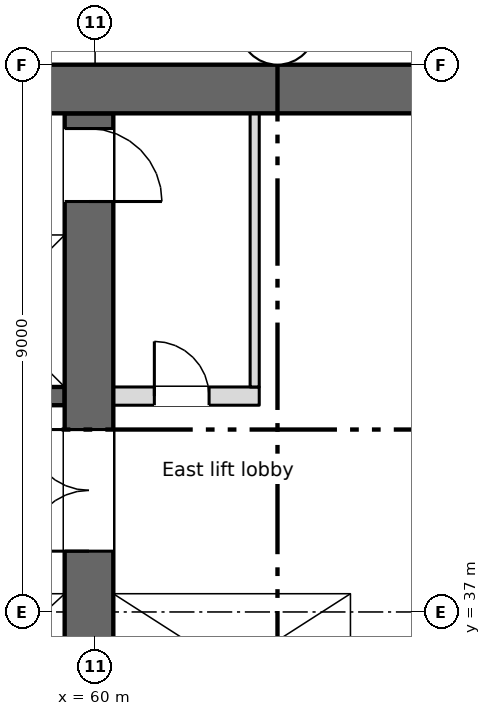
"""IFC4 building model, lengths in metres.
Left out: names, types, materials, properties, quantities, classifications, styles, units other than length and angle.
Written with IfcOpenShell. Run it as: python <this file> out.ifc"""

import sys

from ifc_helpers import new_model, si_unit, direction, frame, frame_2d, origin, place, context, subcontext, project, spatial, rectangle, extrude, element, fill, save


model = new_model("IFC4")
c1 = context("Model", 3, precision=1e-05, world=origin(), true_north=direction((0.0, 1.0)))
c2 = subcontext(c1, "Body", "Model", "MODEL_VIEW")
j1 = project(units=[si_unit("LENGTHUNIT", "METRE"), si_unit("PLANEANGLEUNIT", "RADIAN")], contexts=[c1])
p1 = place(None, origin())
s1 = spatial("IfcSite", under=j1, at=p1, CompositionType="ELEMENT")
p2 = place(p1, origin())
s2 = spatial("IfcBuilding", under=s1, at=p2, CompositionType="ELEMENT")
p3 = place(p2, frame((0.0, 0.0, 102.5)))
s3 = spatial("IfcBuildingStorey", under=s2, at=p3, CompositionType="ELEMENT", Elevation=102.5)
p4 = place(p3, frame((5.55, 45.6, 0.0), z_axis=(0.0, 0.0, 1.0), x_axis=(1.0, 0.0, 0.0)))
e1 = element("IfcWall", 1, at=p4, inside=s3, PredefinedType="SHEAR", context=c2, shape_type="SweptSolid", body=[
    extrude(rectangle(XDim=60.9, YDim=0.8, at=frame_2d((30.45, 0.0))), origin(), (0.0, 0.0, 1.0), 3.35),
])
p5 = place(p4, frame((1.2, 0.0, 0.6)))
e2 = element("IfcOpeningElement", 2, at=p5, cuts=e1, PredefinedType="OPENING", context=c2, shape_type="SweptSolid", body=[
    extrude(rectangle(XDim=0.6, YDim=2.4, at=frame_2d((0.3, 1.2))), frame((0.0, 0.41, 0.0), z_axis=(0.0, -1.0, 0.0), x_axis=(1.0, 0.0, 0.0)), (0.0, 0.0, 1.0), 0.82),
])
p6 = place(p4, frame((7.2, 0.0, 0.6)))
e3 = element("IfcOpeningElement", 3, at=p6, cuts=e1, PredefinedType="OPENING", context=c2, shape_type="SweptSolid", body=[
    extrude(rectangle(XDim=0.6, YDim=2.4, at=frame_2d((0.3, 1.2))), frame((0.0, 0.41, 0.0), z_axis=(0.0, -1.0, 0.0), x_axis=(1.0, 0.0, 0.0)), (0.0, 0.0, 1.0), 0.82),
])
p7 = place(p3, frame((64.35, 34.8, 0.0), z_axis=(0.0, 0.0, 1.0), x_axis=(0.0, 1.0, 0.0)))
e4 = element("IfcWall", 4, at=p7, inside=s3, PredefinedType="SHEAR", context=c2, shape_type="SweptSolid", body=[
    extrude(rectangle(XDim=10.4, YDim=0.3, at=frame_2d((5.2, 0.0))), origin(), (0.0, 0.0, 1.0), 3.35),
])
p8 = place(p3, frame((59.9, 28.4, 0.0), z_axis=(0.0, 0.0, 1.0), x_axis=(0.0, 1.0, 0.0)))
e5 = element("IfcWall", 5, at=p8, inside=s3, PredefinedType="SHEAR", context=c2, shape_type="SweptSolid", body=[
    extrude(rectangle(XDim=16.8, YDim=0.8, at=frame_2d((8.4, 0.0))), origin(), (0.0, 0.0, 1.0), 3.35),
])
p9 = place(p8, frame((9.6, 0.0, 0.0)))
e6 = element("IfcOpeningElement", 6, at=p9, cuts=e5, PredefinedType="OPENING", context=c2, shape_type="SweptSolid", body=[
    extrude(rectangle(XDim=2.0, YDim=2.1, at=frame_2d((1.0, 1.05))), frame((0.0, 0.41, 0.0), z_axis=(0.0, -1.0, 0.0), x_axis=(1.0, 0.0, 0.0)), (0.0, 0.0, 1.0), 0.82),
])
p10 = place(p8, frame((15.35, 0.0, 0.0)))
e7 = element("IfcOpeningElement", 7, at=p10, cuts=e5, PredefinedType="OPENING", context=c2, shape_type="SweptSolid", body=[
    extrude(rectangle(XDim=1.2, YDim=2.1, at=frame_2d((0.6, 1.05))), frame((0.0, 0.41, 0.0), z_axis=(0.0, -1.0, 0.0), x_axis=(1.0, 0.0, 0.0)), (0.0, 0.0, 1.0), 0.82),
])
p11 = place(p3, frame((47.3, 37.45, 0.0), z_axis=(0.0, 0.0, 1.0), x_axis=(1.0, 0.0, 0.0)))
e8 = element("IfcWall", 8, at=p11, inside=s3, PredefinedType="SHEAR", context=c2, shape_type="SweptSolid", body=[
    extrude(rectangle(XDim=12.2, YDim=0.3, at=frame_2d((6.1, 0.0))), origin(), (0.0, 0.0, 1.0), 3.35),
])
p12 = place(p11, frame((4.3, 0.0, 0.0)))
e9 = element("IfcOpeningElement", 9, at=p12, cuts=e8, PredefinedType="OPENING", context=c2, shape_type="SweptSolid", body=[
    extrude(rectangle(XDim=1.1, YDim=2.1, at=frame_2d((0.55, 1.05))), frame((0.0, 0.16, 0.0), z_axis=(0.0, -1.0, 0.0), x_axis=(1.0, 0.0, 0.0)), (0.0, 0.0, 1.0), 0.32),
])
p13 = place(p11, frame((7.3, 0.0, 0.0)))
e10 = element("IfcOpeningElement", 10, at=p13, cuts=e8, PredefinedType="OPENING", context=c2, shape_type="SweptSolid", body=[
    extrude(rectangle(XDim=1.1, YDim=2.1, at=frame_2d((0.55, 1.05))), frame((0.0, 0.16, 0.0), z_axis=(0.0, -1.0, 0.0), x_axis=(1.0, 0.0, 0.0)), (0.0, 0.0, 1.0), 0.32),
])
p14 = place(p11, frame((10.3, 0.0, 0.0)))
e11 = element("IfcOpeningElement", 11, at=p14, cuts=e8, PredefinedType="OPENING", context=c2, shape_type="SweptSolid", body=[
    extrude(rectangle(XDim=1.1, YDim=2.1, at=frame_2d((0.55, 1.05))), frame((0.0, 0.16, 0.0), z_axis=(0.0, -1.0, 0.0), x_axis=(1.0, 0.0, 0.0)), (0.0, 0.0, 1.0), 0.32),
])
p15 = place(p3, frame((60.3, 37.45, 0.0), z_axis=(0.0, 0.0, 1.0), x_axis=(1.0, 0.0, 0.0)))
e12 = element("IfcWall", 12, at=p15, inside=s3, PredefinedType="SHEAR", context=c2, shape_type="SweptSolid", body=[
    extrude(rectangle(XDim=3.9, YDim=0.3, at=frame_2d((1.95, 0.0))), origin(), (0.0, 0.0, 1.0), 3.35),
])
p16 = place(p15, frame((1.4, 0.0, 0.0)))
e13 = element("IfcOpeningElement", 13, at=p16, cuts=e12, PredefinedType="OPENING", context=c2, shape_type="SweptSolid", body=[
    extrude(rectangle(XDim=1.1, YDim=2.1, at=frame_2d((0.55, 1.05))), frame((0.0, 0.16, 0.0), z_axis=(0.0, -1.0, 0.0), x_axis=(1.0, 0.0, 0.0)), (0.0, 0.0, 1.0), 0.32),
])
p17 = place(p3, frame((18.5, 40.55, 0.0), z_axis=(0.0, 0.0, 1.0), x_axis=(1.0, 0.0, 0.0)))
e14 = element("IfcWall", 14, at=p17, inside=s3, PredefinedType="SHEAR", context=c2, shape_type="SweptSolid", body=[
    extrude(rectangle(XDim=41.0, YDim=0.3, at=frame_2d((20.5, 0.0))), origin(), (0.0, 0.0, 1.0), 3.35),
])
p18 = place(p17, frame((18.65, 0.0, 0.0)))
e15 = element("IfcOpeningElement", 15, at=p18, cuts=e14, PredefinedType="OPENING", context=c2, shape_type="SweptSolid", body=[
    extrude(rectangle(XDim=0.9, YDim=2.1, at=frame_2d((0.45, 1.05))), frame((0.0, 0.16, 0.0), z_axis=(0.0, -1.0, 0.0), x_axis=(1.0, 0.0, 0.0)), (0.0, 0.0, 1.0), 0.32),
])
p19 = place(p17, frame((6.175, 0.0, 0.0)))
e16 = element("IfcOpeningElement", 16, at=p19, cuts=e14, PredefinedType="OPENING", context=c2, shape_type="SweptSolid", body=[
    extrude(rectangle(XDim=1.1, YDim=2.1, at=frame_2d((0.55, 1.05))), frame((0.0, 0.16, 0.0), z_axis=(0.0, -1.0, 0.0), x_axis=(1.0, 0.0, 0.0)), (0.0, 0.0, 1.0), 0.32),
])
p20 = place(p17, frame((8.925, 0.0, 0.0)))
e17 = element("IfcOpeningElement", 17, at=p20, cuts=e14, PredefinedType="OPENING", context=c2, shape_type="SweptSolid", body=[
    extrude(rectangle(XDim=1.1, YDim=2.1, at=frame_2d((0.55, 1.05))), frame((0.0, 0.16, 0.0), z_axis=(0.0, -1.0, 0.0), x_axis=(1.0, 0.0, 0.0)), (0.0, 0.0, 1.0), 0.32),
])
p21 = place(p17, frame((11.675, 0.0, 0.0)))
e18 = element("IfcOpeningElement", 18, at=p21, cuts=e14, PredefinedType="OPENING", context=c2, shape_type="SweptSolid", body=[
    extrude(rectangle(XDim=1.1, YDim=2.1, at=frame_2d((0.55, 1.05))), frame((0.0, 0.16, 0.0), z_axis=(0.0, -1.0, 0.0), x_axis=(1.0, 0.0, 0.0)), (0.0, 0.0, 1.0), 0.32),
])
p22 = place(p17, frame((30.925, 0.0, 0.0)))
e19 = element("IfcOpeningElement", 19, at=p22, cuts=e14, PredefinedType="OPENING", context=c2, shape_type="SweptSolid", body=[
    extrude(rectangle(XDim=1.1, YDim=2.1, at=frame_2d((0.55, 1.05))), frame((0.0, 0.16, 0.0), z_axis=(0.0, -1.0, 0.0), x_axis=(1.0, 0.0, 0.0)), (0.0, 0.0, 1.0), 0.32),
])
p23 = place(p17, frame((33.675, 0.0, 0.0)))
e20 = element("IfcOpeningElement", 20, at=p23, cuts=e14, PredefinedType="OPENING", context=c2, shape_type="SweptSolid", body=[
    extrude(rectangle(XDim=1.1, YDim=2.1, at=frame_2d((0.55, 1.05))), frame((0.0, 0.16, 0.0), z_axis=(0.0, -1.0, 0.0), x_axis=(1.0, 0.0, 0.0)), (0.0, 0.0, 1.0), 0.32),
])
p24 = place(p17, frame((36.375, 0.0, 0.0)))
e21 = element("IfcOpeningElement", 21, at=p24, cuts=e14, PredefinedType="OPENING", context=c2, shape_type="SweptSolid", body=[
    extrude(rectangle(XDim=1.2, YDim=2.1, at=frame_2d((0.6, 1.05))), frame((0.0, 0.16, 0.0), z_axis=(0.0, -1.0, 0.0), x_axis=(1.0, 0.0, 0.0)), (0.0, 0.0, 1.0), 0.32),
])
p25 = place(p17, frame((39.15, 0.0, 0.0)))
e22 = element("IfcOpeningElement", 22, at=p25, cuts=e14, PredefinedType="OPENING", context=c2, shape_type="SweptSolid", body=[
    extrude(rectangle(XDim=1.2, YDim=2.1, at=frame_2d((0.6, 1.05))), frame((0.0, 0.16, 0.0), z_axis=(0.0, -1.0, 0.0), x_axis=(1.0, 0.0, 0.0)), (0.0, 0.0, 1.0), 0.32),
])
p26 = place(p3, frame((18.5, 43.35, 0.0), z_axis=(0.0, 0.0, 1.0), x_axis=(1.0, 0.0, 0.0)))
e23 = element("IfcWall", 23, at=p26, inside=s3, PredefinedType="SHEAR", context=c2, shape_type="SweptSolid", body=[
    extrude(rectangle(XDim=41.0, YDim=0.3, at=frame_2d((20.5, 0.0))), origin(), (0.0, 0.0, 1.0), 3.35),
])
p27 = place(p3, frame((60.3, 40.55, 0.0), z_axis=(0.0, 0.0, 1.0), x_axis=(1.0, 0.0, 0.0)))
e24 = element("IfcWall", 24, at=p27, inside=s3, PredefinedType="PARTITIONING", context=c2, shape_type="SweptSolid", body=[
    extrude(rectangle(XDim=2.4, YDim=0.3, at=frame_2d((1.2, 0.0))), origin(), (0.0, 0.0, 1.0), 3.35),
])
p28 = place(p27, frame((0.675, 0.0, 0.0)))
e25 = element("IfcOpeningElement", 25, at=p28, cuts=e24, PredefinedType="OPENING", context=c2, shape_type="SweptSolid", body=[
    extrude(rectangle(XDim=0.9, YDim=2.1, at=frame_2d((0.45, 1.05))), frame((0.0, 0.16, 0.0), z_axis=(0.0, -1.0, 0.0), x_axis=(1.0, 0.0, 0.0)), (0.0, 0.0, 1.0), 0.32),
])
p29 = place(p3, frame((62.625, 40.7, 0.0), z_axis=(0.0, 0.0, 1.0), x_axis=(0.0, 1.0, 0.0)))
e26 = element("IfcWall", 26, at=p29, inside=s3, PredefinedType="PARTITIONING", context=c2, shape_type="SweptSolid", body=[
    extrude(rectangle(XDim=4.5, YDim=0.15, at=frame_2d((2.25, 0.0))), origin(), (0.0, 0.0, 1.0), 3.35),
])
p30 = place(p28, origin())
e27 = element("IfcDoor", 27, at=p30, inside=s3, OperationType="SINGLE_SWING_LEFT", PredefinedType="DOOR", context=c2, shape_type="SweptSolid", body=[
    extrude(rectangle(XDim=0.9, YDim=2.1, at=frame_2d((0.45, 1.05))), frame((0.0, 0.025, 0.0), z_axis=(0.0, -1.0, 0.0), x_axis=(1.0, 0.0, 0.0)), (0.0, 0.0, 1.0), 0.05),
])
fill(e25, e27)
p31 = place(p16, origin())
e28 = element("IfcDoor", 28, at=p31, inside=s3, OperationType="SLIDING_TO_LEFT", PredefinedType="DOOR", context=c2, shape_type="SweptSolid", body=[
    extrude(rectangle(XDim=1.1, YDim=2.1, at=frame_2d((0.55, 1.05))), frame((0.0, 0.025, 0.0), z_axis=(0.0, -1.0, 0.0), x_axis=(1.0, 0.0, 0.0)), (0.0, 0.0, 1.0), 0.05),
])
fill(e13, e28)
p32 = place(p9, origin())
e29 = element("IfcDoor", 29, at=p32, inside=s3, OperationType="DOUBLE_DOOR_SINGLE_SWING", PredefinedType="DOOR", context=c2, shape_type="SweptSolid", body=[
    extrude(rectangle(XDim=2.0, YDim=2.1, at=frame_2d((1.0, 1.05))), frame((0.0, 0.025, 0.0), z_axis=(0.0, -1.0, 0.0), x_axis=(1.0, 0.0, 0.0)), (0.0, 0.0, 1.0), 0.05),
])
fill(e6, e29)
p33 = place(p10, origin())
e30 = element("IfcDoor", 30, at=p33, inside=s3, OperationType="SINGLE_SWING_LEFT", PredefinedType="DOOR", context=c2, shape_type="SweptSolid", body=[
    extrude(rectangle(XDim=1.2, YDim=2.1, at=frame_2d((0.6, 1.05))), frame((0.0, 0.025, 0.0), z_axis=(0.0, -1.0, 0.0), x_axis=(1.0, 0.0, 0.0)), (0.0, 0.0, 1.0), 0.05),
])
fill(e7, e30)
save(model, sys.argv[1])
